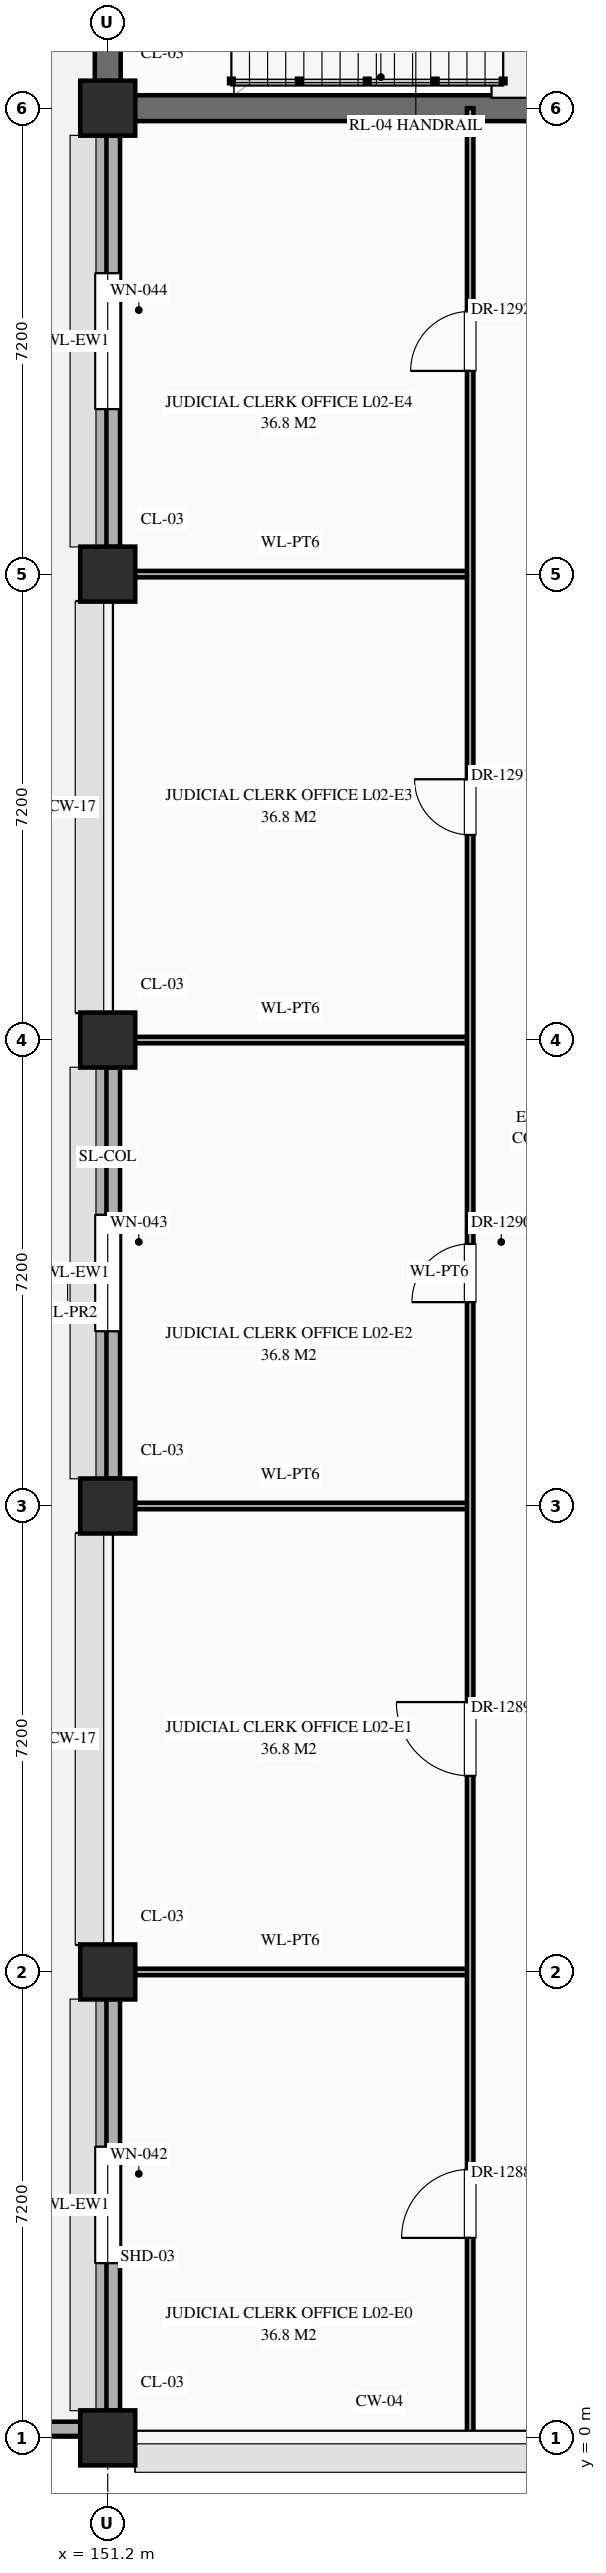
"""IFC4 building model, lengths in metres.
Left out: names, types, materials, properties, quantities, classifications, styles, units other than length and angle.
Written with IfcOpenShell. Run it as: python <this file> out.ifc"""

import sys

from ifc_helpers import new_model, si_unit, direction, frame, frame_2d, origin, origin_2d, place, context, subcontext, project, spatial, rectangle, extrude, element, fill, save


model = new_model("IFC4")
c1 = context("Model", 3, precision=1e-05, world=origin(), true_north=direction((0.0, 1.0)))
c2 = subcontext(c1, "Body", "Model", "MODEL_VIEW")
j1 = project(units=[si_unit("LENGTHUNIT", "METRE"), si_unit("PLANEANGLEUNIT", "RADIAN")], contexts=[c1])
p1 = place(None, origin())
s1 = spatial("IfcSite", under=j1, at=p1, CompositionType="ELEMENT")
p2 = place(p1, origin())
s2 = spatial("IfcBuilding", under=s1, at=p2, CompositionType="ELEMENT")
p3 = place(p2, frame((0.0, 0.0, 5.4)))
s3 = spatial("IfcBuildingStorey", under=s2, at=p3, CompositionType="ELEMENT", Elevation=5.4)
for number, where, z_axis, x_axis in (
    (1, (151.2, 0.0, 0.0), (0.0, 0.0, 1.0), (1.0, 0.0, 0.0)),
    (2, (151.2, 7.2, 0.0), (0.0, 0.0, 1.0), (1.0, 0.0, 0.0)),
    (3, (151.2, 14.4, 0.0), (0.0, 0.0, 1.0), (1.0, 0.0, 0.0)),
    (4, (151.2, 21.6, 0.0), (0.0, 0.0, 1.0), (1.0, 0.0, 0.0)),
    (5, (151.2, 28.8, 0.0), (0.0, 0.0, 1.0), (1.0, 0.0, 0.0)),
    (6, (151.2, 36.0, 0.0), (0.0, 0.0, 1.0), (1.0, 0.0, 0.0)),
):
    element("IfcColumn", number, at=place(p3, frame(where, z_axis=z_axis, x_axis=x_axis)), inside=s3, PredefinedType="COLUMN", context=c2, shape_type="SweptSolid", body=[
        extrude(rectangle(XDim=0.85, YDim=0.85, at=origin_2d()), origin(), (0.0, 0.0, 1.0), 5.4),
    ])
p4 = place(p3, frame((151.2, 0.42, 0.0), z_axis=(0.0, 0.0, 1.0), x_axis=(0.0, 1.0, 0.0)))
e7 = element("IfcWall", 7, at=p4, inside=s3, PredefinedType="STANDARD", context=c2, shape_type="SweptSolid", body=[
    extrude(rectangle(XDim=6.36, YDim=0.38, at=frame_2d((3.18, 0.0))), origin(), (0.0, 0.0, 1.0), 4.4),
])
p5 = place(p4, frame((2.28, 0.0, 0.85)))
e8 = element("IfcOpeningElement", 8, at=p5, cuts=e7, PredefinedType="OPENING", context=c2, shape_type="SweptSolid", body=[
    extrude(rectangle(XDim=1.8, YDim=1.56, at=frame_2d((0.9, 0.78))), frame((0.0, 0.202, 0.0), z_axis=(0.0, -1.0, 0.0), x_axis=(1.0, 0.0, 0.0)), (0.0, 0.0, 1.0), 0.404),
])
p6 = place(p3, frame((151.2, 14.82, 0.0), z_axis=(0.0, 0.0, 1.0), x_axis=(0.0, 1.0, 0.0)))
e9 = element("IfcWall", 9, at=p6, inside=s3, PredefinedType="STANDARD", context=c2, shape_type="SweptSolid", body=[
    extrude(rectangle(XDim=6.36, YDim=0.38, at=frame_2d((3.18, 0.0))), origin(), (0.0, 0.0, 1.0), 4.4),
])
p7 = place(p6, frame((2.28, 0.0, 0.85)))
e10 = element("IfcOpeningElement", 10, at=p7, cuts=e9, PredefinedType="OPENING", context=c2, shape_type="SweptSolid", body=[
    extrude(rectangle(XDim=1.8, YDim=1.92, at=frame_2d((0.9, 0.96))), frame((0.0, 0.202, 0.0), z_axis=(0.0, -1.0, 0.0), x_axis=(1.0, 0.0, 0.0)), (0.0, 0.0, 1.0), 0.404),
])
p8 = place(p3, frame((151.2, 29.22, 0.0), z_axis=(0.0, 0.0, 1.0), x_axis=(0.0, 1.0, 0.0)))
e11 = element("IfcWall", 11, at=p8, inside=s3, PredefinedType="STANDARD", context=c2, shape_type="SweptSolid", body=[
    extrude(rectangle(XDim=6.36, YDim=0.38, at=frame_2d((3.18, 0.0))), origin(), (0.0, 0.0, 1.0), 4.4),
])
p9 = place(p8, frame((2.13, 0.0, 0.85)))
e12 = element("IfcOpeningElement", 12, at=p9, cuts=e11, PredefinedType="OPENING", context=c2, shape_type="SweptSolid", body=[
    extrude(rectangle(XDim=2.1, YDim=1.2, at=frame_2d((1.05, 0.6))), frame((0.0, 0.202, 0.0), z_axis=(0.0, -1.0, 0.0), x_axis=(1.0, 0.0, 0.0)), (0.0, 0.0, 1.0), 0.404),
])
p10 = place(p3, frame((151.2, 36.42, 0.0), z_axis=(0.0, 0.0, 1.0), x_axis=(0.0, 1.0, 0.0)))
e13 = element("IfcWall", 13, at=p10, inside=s3, PredefinedType="SHEAR", context=c2, shape_type="SweptSolid", body=[
    extrude(rectangle(XDim=6.36, YDim=0.4, at=frame_2d((3.18, 0.0))), origin(), (0.0, 0.0, 1.0), 5.12),
])
p11 = place(p3, frame((146.84, 0.14, 4.8), z_axis=(0.0, 0.0, 1.0), x_axis=(1.0, 0.0, 0.0)))
e14 = element("IfcWall", 14, at=p11, inside=s3, PredefinedType="PARAPET", context=c2, shape_type="SweptSolid", body=[
    extrude(rectangle(XDim=4.22, YDim=0.22, at=frame_2d((2.11, 0.0))), origin(), (0.0, 0.0, 1.0), 1.2),
])
p12 = place(p3, frame((151.06, 0.14, 4.8), z_axis=(0.0, 0.0, 1.0), x_axis=(0.0, 1.0, 0.0)))
e15 = element("IfcWall", 15, at=p12, inside=s3, PredefinedType="PARAPET", context=c2, shape_type="SweptSolid", body=[
    extrude(rectangle(XDim=35.595, YDim=0.24, at=frame_2d((17.797, 0.0))), origin(), (0.0, 0.0, 1.0), 1.2),
])
for number, where, z_axis, x_axis in (
    (16, (151.24, 7.2, 0.0), (0.0, 0.0, 1.0), (1.0, 0.0, 0.0)),
    (17, (151.24, 14.4, 0.0), (0.0, 0.0, 1.0), (1.0, 0.0, 0.0)),
    (18, (151.24, 21.6, 0.0), (0.0, 0.0, 1.0), (1.0, 0.0, 0.0)),
    (19, (151.24, 28.8, 0.0), (0.0, 0.0, 1.0), (1.0, 0.0, 0.0)),
):
    element("IfcWall", number, at=place(p3, frame(where, z_axis=z_axis, x_axis=x_axis)), inside=s3, PredefinedType="STANDARD", context=c2, shape_type="SweptSolid", body=[
        extrude(rectangle(XDim=5.56, YDim=0.1, at=frame_2d((2.78, 0.0))), origin(), (0.0, 0.0, 1.0), 4.2),
    ])
p13 = place(p3, frame((151.24, 36.0, 0.0), z_axis=(0.0, 0.0, 1.0), x_axis=(1.0, 0.0, 0.0)))
e20 = element("IfcWall", 20, at=p13, inside=s3, PredefinedType="SHEAR", context=c2, shape_type="SweptSolid", body=[
    extrude(rectangle(XDim=8.36, YDim=0.4, at=frame_2d((4.18, 0.0))), origin(), (0.0, 0.0, 1.0), 5.05),
])
p14 = place(p3, frame((156.8, 0.04, 0.0), z_axis=(0.0, 0.0, 1.0), x_axis=(0.0, 1.0, 0.0)))
e21 = element("IfcWall", 21, at=p14, inside=s3, PredefinedType="STANDARD", context=c2, shape_type="SweptSolid", body=[
    extrude(rectangle(XDim=35.96, YDim=0.1, at=frame_2d((17.98, 0.0))), origin(), (0.0, 0.0, 1.0), 5.05),
])
p15 = place(p14, frame((3.05, 0.0, 0.0)))
e22 = element("IfcOpeningElement", 22, at=p15, cuts=e21, PredefinedType="OPENING", context=c2, shape_type="SweptSolid", body=[
    extrude(rectangle(XDim=1.06, YDim=2.4, at=frame_2d((0.53, 1.2))), frame((0.0, 0.062, 0.0), z_axis=(0.0, -1.0, 0.0), x_axis=(1.0, 0.0, 0.0)), (0.0, 0.0, 1.0), 0.124),
])
p16 = place(p14, frame((10.19, 0.0, 0.0)))
e23 = element("IfcOpeningElement", 23, at=p16, cuts=e21, PredefinedType="OPENING", context=c2, shape_type="SweptSolid", body=[
    extrude(rectangle(XDim=1.14, YDim=2.4, at=frame_2d((0.57, 1.2))), frame((0.0, 0.062, 0.0), z_axis=(0.0, -1.0, 0.0), x_axis=(1.0, 0.0, 0.0)), (0.0, 0.0, 1.0), 0.124),
])
p17 = place(p14, frame((17.51, 0.0, 0.0)))
e24 = element("IfcOpeningElement", 24, at=p17, cuts=e21, PredefinedType="OPENING", context=c2, shape_type="SweptSolid", body=[
    extrude(rectangle(XDim=0.9, YDim=2.15, at=frame_2d((0.45, 1.075))), frame((0.0, 0.062, 0.0), z_axis=(0.0, -1.0, 0.0), x_axis=(1.0, 0.0, 0.0)), (0.0, 0.0, 1.0), 0.124),
])
p18 = place(p14, frame((24.73, 0.0, 0.0)))
e25 = element("IfcOpeningElement", 25, at=p18, cuts=e21, PredefinedType="OPENING", context=c2, shape_type="SweptSolid", body=[
    extrude(rectangle(XDim=0.86, YDim=2.1, at=frame_2d((0.43, 1.05))), frame((0.0, 0.062, 0.0), z_axis=(0.0, -1.0, 0.0), x_axis=(1.0, 0.0, 0.0)), (0.0, 0.0, 1.0), 0.124),
])
p19 = place(p14, frame((31.9, 0.0, 0.0)))
e26 = element("IfcOpeningElement", 26, at=p19, cuts=e21, PredefinedType="OPENING", context=c2, shape_type="SweptSolid", body=[
    extrude(rectangle(XDim=0.92, YDim=2.15, at=frame_2d((0.46, 1.075))), frame((0.0, 0.062, 0.0), z_axis=(0.0, -1.0, 0.0), x_axis=(1.0, 0.0, 0.0)), (0.0, 0.0, 1.0), 0.124),
])
p20 = place(p5, origin())
e27 = element("IfcWindow", 27, at=p20, inside=s3, PartitioningType="SINGLE_PANEL", PredefinedType="WINDOW", context=c2, shape_type="SweptSolid", body=[
    extrude(rectangle(XDim=1.8, YDim=1.56, at=frame_2d((0.9, 0.78))), frame((0.0, 0.03, 0.0), z_axis=(0.0, -1.0, 0.0), x_axis=(1.0, 0.0, 0.0)), (0.0, 0.0, 1.0), 0.06),
])
fill(e8, e27)
p21 = place(p7, origin())
e28 = element("IfcWindow", 28, at=p21, inside=s3, PartitioningType="SINGLE_PANEL", PredefinedType="WINDOW", context=c2, shape_type="SweptSolid", body=[
    extrude(rectangle(XDim=1.8, YDim=1.92, at=frame_2d((0.9, 0.96))), frame((0.0, 0.03, 0.0), z_axis=(0.0, -1.0, 0.0), x_axis=(1.0, 0.0, 0.0)), (0.0, 0.0, 1.0), 0.06),
])
fill(e10, e28)
p22 = place(p9, origin())
e29 = element("IfcWindow", 29, at=p22, inside=s3, PartitioningType="SINGLE_PANEL", PredefinedType="WINDOW", context=c2, shape_type="SweptSolid", body=[
    extrude(rectangle(XDim=2.1, YDim=1.2, at=frame_2d((1.05, 0.6))), frame((0.0, 0.03, 0.0), z_axis=(0.0, -1.0, 0.0), x_axis=(1.0, 0.0, 0.0)), (0.0, 0.0, 1.0), 0.06),
])
fill(e12, e29)
p23 = place(p15, origin())
e30 = element("IfcDoor", 30, at=p23, inside=s3, OperationType="SINGLE_SWING_LEFT", PredefinedType="DOOR", context=c2, shape_type="SweptSolid", body=[
    extrude(rectangle(XDim=1.06, YDim=2.4, at=frame_2d((0.53, 1.2))), frame((0.0, 0.025, 0.0), z_axis=(0.0, -1.0, 0.0), x_axis=(1.0, 0.0, 0.0)), (0.0, 0.0, 1.0), 0.05),
])
fill(e22, e30)
p24 = place(p16, origin())
e31 = element("IfcDoor", 31, at=p24, inside=s3, OperationType="SINGLE_SWING_RIGHT", PredefinedType="DOOR", context=c2, shape_type="SweptSolid", body=[
    extrude(rectangle(XDim=1.14, YDim=2.4, at=frame_2d((0.57, 1.2))), frame((0.0, 0.025, 0.0), z_axis=(0.0, -1.0, 0.0), x_axis=(1.0, 0.0, 0.0)), (0.0, 0.0, 1.0), 0.05),
])
fill(e23, e31)
p25 = place(p17, origin())
e32 = element("IfcDoor", 32, at=p25, inside=s3, OperationType="SINGLE_SWING_LEFT", PredefinedType="DOOR", context=c2, shape_type="SweptSolid", body=[
    extrude(rectangle(XDim=0.9, YDim=2.15, at=frame_2d((0.45, 1.075))), frame((0.0, 0.025, 0.0), z_axis=(0.0, -1.0, 0.0), x_axis=(1.0, 0.0, 0.0)), (0.0, 0.0, 1.0), 0.05),
])
fill(e24, e32)
p26 = place(p18, origin())
e33 = element("IfcDoor", 33, at=p26, inside=s3, OperationType="SINGLE_SWING_RIGHT", PredefinedType="DOOR", context=c2, shape_type="SweptSolid", body=[
    extrude(rectangle(XDim=0.86, YDim=2.1, at=frame_2d((0.43, 1.05))), frame((0.0, 0.025, 0.0), z_axis=(0.0, -1.0, 0.0), x_axis=(1.0, 0.0, 0.0)), (0.0, 0.0, 1.0), 0.05),
])
fill(e25, e33)
p27 = place(p19, origin())
e34 = element("IfcDoor", 34, at=p27, inside=s3, OperationType="SINGLE_SWING_LEFT", PredefinedType="DOOR", context=c2, shape_type="SweptSolid", body=[
    extrude(rectangle(XDim=0.92, YDim=2.15, at=frame_2d((0.46, 1.075))), frame((0.0, 0.025, 0.0), z_axis=(0.0, -1.0, 0.0), x_axis=(1.0, 0.0, 0.0)), (0.0, 0.0, 1.0), 0.05),
])
fill(e26, e34)
save(model, sys.argv[1])
